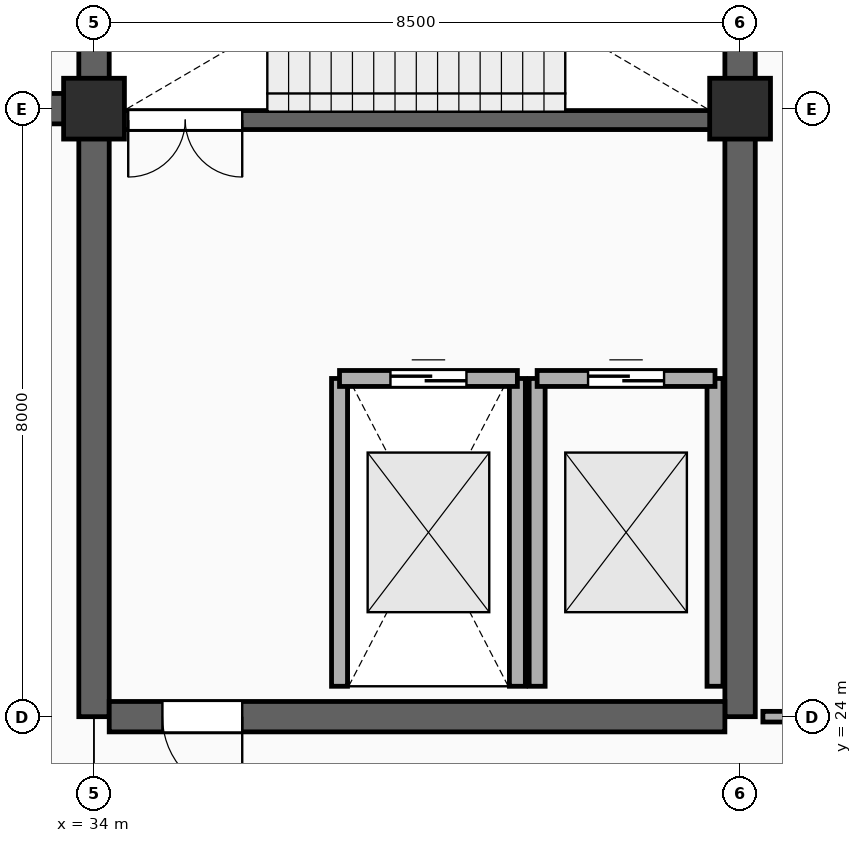
"""IFC4 building model, lengths in metres.
Left out: names, types, materials, properties, quantities, classifications, styles, units other than length and angle.
Written with IfcOpenShell. Run it as: python <this file> out.ifc"""

import sys

from ifc_helpers import new_model, si_unit, direction, frame, frame_2d, origin, origin_2d, place, context, subcontext, project, spatial, rectangle, extrude, element, fill, save


model = new_model("IFC4")
c1 = context("Model", 3, precision=1e-05, world=origin(), true_north=direction((0.0, 1.0)))
c2 = subcontext(c1, "Body", "Model", "MODEL_VIEW")
j1 = project(units=[si_unit("LENGTHUNIT", "METRE"), si_unit("PLANEANGLEUNIT", "RADIAN")], contexts=[c1])
p1 = place(None, origin())
s1 = spatial("IfcSite", under=j1, at=p1, CompositionType="ELEMENT")
p2 = place(p1, origin())
s2 = spatial("IfcBuilding", under=s1, at=p2, CompositionType="ELEMENT")
p3 = place(p2, origin())
s3 = spatial("IfcBuildingStorey", under=s2, at=p3, CompositionType="ELEMENT", Elevation=0.0)
p4 = place(p3, frame((34.0, 32.0, 0.0), z_axis=(0.0, 0.0, 1.0), x_axis=(0.0, 1.0, 0.0)))
e1 = element("IfcWall", 1, at=p4, inside=s3, PredefinedType="SHEAR", context=c2, shape_type="SweptSolid", body=[
    extrude(rectangle(XDim=12.8, YDim=0.4, at=frame_2d((6.4, 0.0))), origin(), (0.0, 0.0, 1.0), 5.24),
])
p5 = place(p3, frame((25.7, 32.0, 0.0), z_axis=(0.0, 0.0, 1.0), x_axis=(1.0, 0.0, 0.0)))
e2 = element("IfcWall", 2, at=p5, inside=s3, PredefinedType="SHEAR", context=c2, shape_type="SweptSolid", body=[
    extrude(rectangle(XDim=8.1, YDim=0.4, at=frame_2d((4.05, 0.0))), origin(), (0.0, 0.0, 1.0), 5.24),
])
p6 = place(p3, frame((34.0, 24.0, 0.0), z_axis=(0.0, 0.0, 1.0), x_axis=(0.0, 1.0, 0.0)))
e3 = element("IfcWall", 3, at=p6, inside=s3, PredefinedType="SHEAR", context=c2, shape_type="SweptSolid", body=[
    extrude(rectangle(XDim=7.8, YDim=0.4, at=frame_2d((3.9, 0.0))), origin(), (0.0, 0.0, 1.0), 5.24),
])
p7 = place(p3, frame((42.5, 24.0, 0.0), z_axis=(0.0, 0.0, 1.0), x_axis=(0.0, 1.0, 0.0)))
e4 = element("IfcWall", 4, at=p7, inside=s3, PredefinedType="SHEAR", context=c2, shape_type="SweptSolid", body=[
    extrude(rectangle(XDim=12.8, YDim=0.4, at=frame_2d((6.4, 0.0))), origin(), (0.0, 0.0, 1.0), 5.24),
])
p8 = place(p3, frame((34.2, 24.0, 0.0), z_axis=(0.0, 0.0, 1.0), x_axis=(1.0, 0.0, 0.0)))
e5 = element("IfcWall", 5, at=p8, inside=s3, PredefinedType="SHEAR", context=c2, shape_type="SweptSolid", body=[
    extrude(rectangle(XDim=8.1, YDim=0.4, at=frame_2d((4.05, 0.0))), origin(), (0.0, 0.0, 1.0), 5.24),
])
p9 = place(p8, frame((0.7, 0.0, 0.0)))
e6 = element("IfcOpeningElement", 6, at=p9, cuts=e5, PredefinedType="OPENING", context=c2, shape_type="SweptSolid", body=[
    extrude(rectangle(XDim=1.05, YDim=2.15, at=frame_2d((0.525, 1.075))), frame((0.0, 0.212, 0.0), z_axis=(0.0, -1.0, 0.0), x_axis=(1.0, 0.0, 0.0)), (0.0, 0.0, 1.0), 0.424),
])
p10 = place(p3, frame((34.25, 31.85, 0.0), z_axis=(0.0, 0.0, 1.0), x_axis=(1.0, 0.0, 0.0)))
e7 = element("IfcWall", 7, at=p10, inside=s3, PredefinedType="STANDARD", context=c2, shape_type="SweptSolid", body=[
    extrude(rectangle(XDim=8.0, YDim=0.25, at=frame_2d((4.0, 0.0))), origin(), (0.0, 0.0, 1.0), 5.24),
])
p11 = place(p10, frame((0.2, 0.0, 0.0)))
e8 = element("IfcOpeningElement", 8, at=p11, cuts=e7, PredefinedType="OPENING", context=c2, shape_type="SweptSolid", body=[
    extrude(rectangle(XDim=1.5, YDim=2.2, at=frame_2d((0.75, 1.1))), frame((0.0, 0.137, 0.0), z_axis=(0.0, -1.0, 0.0), x_axis=(1.0, 0.0, 0.0)), (0.0, 0.0, 1.0), 0.274),
])
for number, where, z_axis, x_axis in (
    (9, (37.23, 24.4, 0.0), (0.0, 0.0, 1.0), (0.0, 1.0, 0.0)),
    (10, (39.57, 24.4, 0.0), (0.0, 0.0, 1.0), (0.0, 1.0, 0.0)),
):
    element("IfcWall", number, at=place(p3, frame(where, z_axis=z_axis, x_axis=x_axis)), inside=s3, PredefinedType="PARTITIONING", context=c2, shape_type="SweptSolid", body=[
        extrude(rectangle(XDim=4.05, YDim=0.21, at=frame_2d((2.025, 0.0))), origin(), (0.0, 0.0, 1.0), 5.24),
    ])
p12 = place(p3, frame((37.23, 28.45, 0.0), z_axis=(0.0, 0.0, 1.0), x_axis=(1.0, 0.0, 0.0)))
e11 = element("IfcWall", 11, at=p12, inside=s3, PredefinedType="PARTITIONING", context=c2, shape_type="SweptSolid", body=[
    extrude(rectangle(XDim=2.34, YDim=0.21, at=frame_2d((1.17, 0.0))), origin(), (0.0, 0.0, 1.0), 5.24),
])
p13 = place(p12, frame((0.67, 0.0, 0.0)))
e12 = element("IfcOpeningElement", 12, at=p13, cuts=e11, PredefinedType="OPENING", context=c2, shape_type="SweptSolid", body=[
    extrude(rectangle(XDim=1.0, YDim=2.2, at=frame_2d((0.5, 1.1))), frame((0.0, 0.117, 0.0), z_axis=(0.0, -1.0, 0.0), x_axis=(1.0, 0.0, 0.0)), (0.0, 0.0, 1.0), 0.234),
])
for number, where, z_axis, x_axis in (
    (13, (39.83, 24.4, 0.0), (0.0, 0.0, 1.0), (0.0, 1.0, 0.0)),
    (14, (42.17, 24.4, 0.0), (0.0, 0.0, 1.0), (0.0, 1.0, 0.0)),
):
    element("IfcWall", number, at=place(p3, frame(where, z_axis=z_axis, x_axis=x_axis)), inside=s3, PredefinedType="PARTITIONING", context=c2, shape_type="SweptSolid", body=[
        extrude(rectangle(XDim=4.05, YDim=0.21, at=frame_2d((2.025, 0.0))), origin(), (0.0, 0.0, 1.0), 5.24),
    ])
p14 = place(p3, frame((39.83, 28.45, 0.0), z_axis=(0.0, 0.0, 1.0), x_axis=(1.0, 0.0, 0.0)))
e15 = element("IfcWall", 15, at=p14, inside=s3, PredefinedType="PARTITIONING", context=c2, shape_type="SweptSolid", body=[
    extrude(rectangle(XDim=2.34, YDim=0.21, at=frame_2d((1.17, 0.0))), origin(), (0.0, 0.0, 1.0), 5.24),
])
p15 = place(p14, frame((0.67, 0.0, 0.0)))
e16 = element("IfcOpeningElement", 16, at=p15, cuts=e15, PredefinedType="OPENING", context=c2, shape_type="SweptSolid", body=[
    extrude(rectangle(XDim=1.0, YDim=2.2, at=frame_2d((0.5, 1.1))), frame((0.0, 0.117, 0.0), z_axis=(0.0, -1.0, 0.0), x_axis=(1.0, 0.0, 0.0)), (0.0, 0.0, 1.0), 0.234),
])
for number, where, z_axis, x_axis in (
    (17, (34.0, 32.0, 0.0), (0.0, 0.0, 1.0), (1.0, 0.0, 0.0)),
    (18, (42.5, 32.0, 0.0), (0.0, 0.0, 1.0), (1.0, 0.0, 0.0)),
):
    element("IfcColumn", number, at=place(p3, frame(where, z_axis=z_axis, x_axis=x_axis)), inside=s3, PredefinedType="COLUMN", context=c2, shape_type="SweptSolid", body=[
        extrude(rectangle(XDim=0.8, YDim=0.8, at=origin_2d()), origin(), (0.0, 0.0, 1.0), 5.14),
    ])
p16 = place(p3, frame((42.8, 24.0, 0.0), z_axis=(0.0, 0.0, 1.0), x_axis=(1.0, 0.0, 0.0)))
e19 = element("IfcWall", 19, at=p16, inside=s3, PredefinedType="PARTITIONING", context=c2, shape_type="SweptSolid", body=[
    extrude(rectangle(XDim=24.9, YDim=0.14, at=frame_2d((12.45, 0.0))), origin(), (0.0, 0.0, 1.0), 4.18),
])
p17 = place(p16, frame((10.0, 0.0, 0.0)))
e20 = element("IfcOpeningElement", 20, at=p17, cuts=e19, PredefinedType="OPENING", context=c2, shape_type="SweptSolid", body=[
    extrude(rectangle(XDim=1.35, YDim=2.25, at=frame_2d((0.675, 1.125))), frame((0.0, 0.082, 0.0), z_axis=(0.0, -1.0, 0.0), x_axis=(1.0, 0.0, 0.0)), (0.0, 0.0, 1.0), 0.164),
])
p18 = place(p11, frame((1.5, 0.0, 0.0), z_axis=(0.0, 0.0, 1.0), x_axis=(-1.0, 0.0, 0.0)))
e21 = element("IfcDoor", 21, at=p18, inside=s3, OperationType="DOUBLE_DOOR_SINGLE_SWING", PredefinedType="DOOR", context=c2, shape_type="SweptSolid", body=[
    extrude(rectangle(XDim=1.5, YDim=2.2, at=frame_2d((0.75, 1.1))), frame((0.0, 0.025, 0.0), z_axis=(0.0, -1.0, 0.0), x_axis=(1.0, 0.0, 0.0)), (0.0, 0.0, 1.0), 0.05),
])
fill(e8, e21)
p19 = place(p13, origin())
e22 = element("IfcDoor", 22, at=p19, inside=s3, OperationType="DOUBLE_DOOR_SLIDING", PredefinedType="DOOR", context=c2, shape_type="SweptSolid", body=[
    extrude(rectangle(XDim=1.0, YDim=2.2, at=frame_2d((0.5, 1.1))), frame((0.0, 0.025, 0.0), z_axis=(0.0, -1.0, 0.0), x_axis=(1.0, 0.0, 0.0)), (0.0, 0.0, 1.0), 0.05),
])
fill(e12, e22)
p20 = place(p15, origin())
e23 = element("IfcDoor", 23, at=p20, inside=s3, OperationType="DOUBLE_DOOR_SLIDING", PredefinedType="DOOR", context=c2, shape_type="SweptSolid", body=[
    extrude(rectangle(XDim=1.0, YDim=2.2, at=frame_2d((0.5, 1.1))), frame((0.0, 0.025, 0.0), z_axis=(0.0, -1.0, 0.0), x_axis=(1.0, 0.0, 0.0)), (0.0, 0.0, 1.0), 0.05),
])
fill(e16, e23)
p21 = place(p9, frame((1.05, 0.0, 0.0), z_axis=(0.0, 0.0, 1.0), x_axis=(-1.0, 0.0, 0.0)))
e24 = element("IfcDoor", 24, at=p21, inside=s3, OperationType="SINGLE_SWING_RIGHT", PredefinedType="DOOR", context=c2, shape_type="SweptSolid", body=[
    extrude(rectangle(XDim=1.05, YDim=2.15, at=frame_2d((0.525, 1.075))), frame((0.0, 0.025, 0.0), z_axis=(0.0, -1.0, 0.0), x_axis=(1.0, 0.0, 0.0)), (0.0, 0.0, 1.0), 0.05),
])
fill(e6, e24)
save(model, sys.argv[1])
